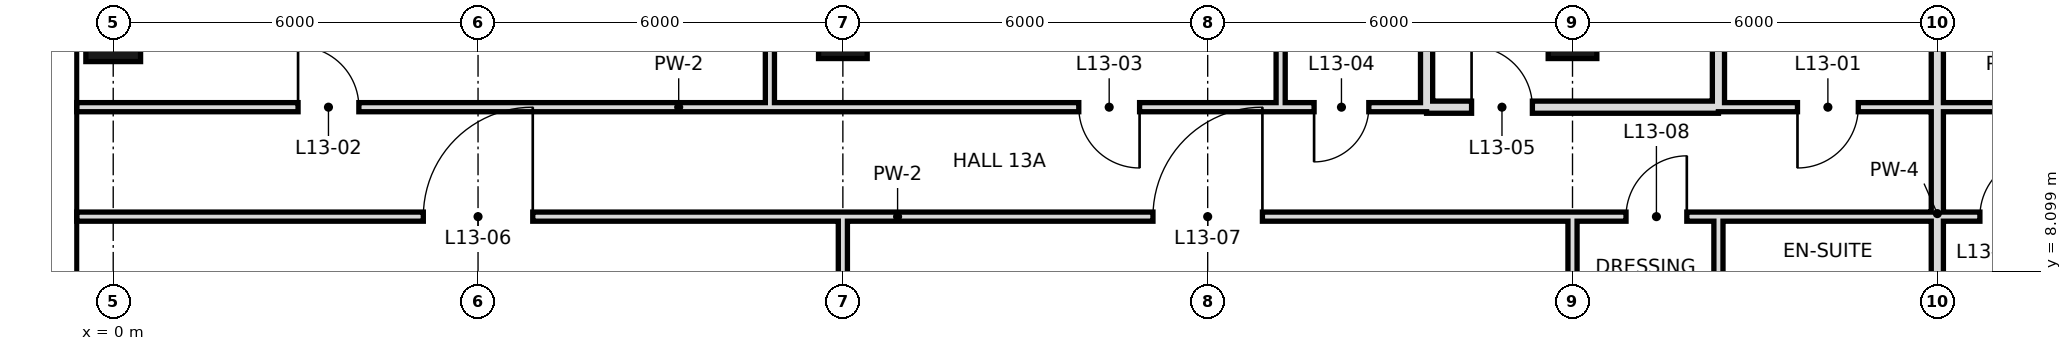
"""IFC4 building model, lengths in metres.
Left out: names, types, materials, properties, quantities, classifications, styles, units other than length and angle.
Written with IfcOpenShell. Run it as: python <this file> out.ifc"""

import sys

from ifc_helpers import new_model, si_unit, direction, frame, frame_2d, origin, origin_2d, place, context, subcontext, project, spatial, rectangle, hollow_rectangle, extrude, element, fill, save


model = new_model("IFC4")
c1 = context("Model", 3, precision=1e-05, world=origin(), true_north=direction((0.0, 1.0)))
c2 = subcontext(c1, "Body", "Model", "MODEL_VIEW")
j1 = project(units=[si_unit("LENGTHUNIT", "METRE"), si_unit("PLANEANGLEUNIT", "RADIAN")], contexts=[c1])
p1 = place(None, origin())
s1 = spatial("IfcSite", under=j1, at=p1, CompositionType="ELEMENT")
p2 = place(p1, origin())
s2 = spatial("IfcBuilding", under=s1, at=p2, CompositionType="ELEMENT")
p3 = place(p2, frame((0.0, 0.0, 67.8)))
s3 = spatial("IfcBuildingStorey", under=s2, at=p3, CompositionType="ELEMENT", Elevation=67.8)
p4 = place(p3, frame((0.0, 12.0, 0.0), z_axis=(0.0, 0.0, 1.0), x_axis=(1.0, 0.0, 0.0)))
e1 = element("IfcColumn", 1, at=p4, inside=s3, PredefinedType="COLUMN", context=c2, shape_type="SweptSolid", body=[
    extrude(hollow_rectangle(XDim=0.9, YDim=0.9, WallThickness=0.045, at=origin_2d()), origin(), (0.0, 0.0, 1.0), 3.6),
])
for number, where, z_axis, x_axis in (
    (2, (12.0, 12.0, 0.0), (0.0, 0.0, 1.0), (1.0, 0.0, 0.0)),
    (3, (24.0, 12.0, 0.0), (0.0, 0.0, 1.0), (1.0, 0.0, 0.0)),
):
    element("IfcColumn", number, at=place(p3, frame(where, z_axis=z_axis, x_axis=x_axis)), inside=s3, PredefinedType="COLUMN", context=c2, shape_type="SweptSolid", body=[
        extrude(hollow_rectangle(XDim=0.8, YDim=0.8, WallThickness=0.04, at=origin_2d()), origin(), (0.0, 0.0, 1.0), 3.6),
    ])
p5 = place(p3, frame((10.8, 10.8, 0.0), z_axis=(0.0, 0.0, 1.0), x_axis=(0.0, 1.0, 0.0)))
e4 = element("IfcWall", 4, at=p5, inside=s3, PredefinedType="PARTITIONING", context=c2, shape_type="SweptSolid", body=[
    extrude(rectangle(XDim=7.9, YDim=0.15, at=frame_2d((3.95, 0.0))), origin(), (0.0, 0.0, 1.0), 3.42),
])
p6 = place(p3, frame((12.0, 0.0, 0.0), z_axis=(0.0, 0.0, 1.0), x_axis=(0.0, 1.0, 0.0)))
e5 = element("IfcWall", 5, at=p6, inside=s3, PredefinedType="PARTITIONING", context=c2, shape_type="SweptSolid", body=[
    extrude(rectangle(XDim=9.0, YDim=0.15, at=frame_2d((4.5, 0.0))), origin(), (0.0, 0.0, 1.0), 2.72),
])
p7 = place(p3, frame((19.2, 10.8, 0.0), z_axis=(0.0, 0.0, 1.0), x_axis=(0.0, 1.0, 0.0)))
e6 = element("IfcWall", 6, at=p7, inside=s3, PredefinedType="PARTITIONING", context=c2, shape_type="SweptSolid", body=[
    extrude(rectangle(XDim=7.9, YDim=0.15, at=frame_2d((3.95, 0.0))), origin(), (0.0, 0.0, 1.0), 3.42),
])
p8 = place(p3, frame((21.6, 10.8, 0.0), z_axis=(0.0, 0.0, 1.0), x_axis=(0.0, 1.0, 0.0)))
e7 = element("IfcWall", 7, at=p8, inside=s3, PredefinedType="SOLIDWALL", context=c2, shape_type="SweptSolid", body=[
    extrude(rectangle(XDim=7.9, YDim=0.2, at=frame_2d((3.95, 0.0))), origin(), (0.0, 0.0, 1.0), 2.72),
])
p9 = place(p3, frame((24.0, 0.0, 0.0), z_axis=(0.0, 0.0, 1.0), x_axis=(0.0, 1.0, 0.0)))
e8 = element("IfcWall", 8, at=p9, inside=s3, PredefinedType="PARTITIONING", context=c2, shape_type="SweptSolid", body=[
    extrude(rectangle(XDim=9.0, YDim=0.15, at=frame_2d((4.5, 0.0))), origin(), (0.0, 0.0, 1.0), 2.72),
])
p10 = place(p3, frame((26.4, 10.8, 0.0), z_axis=(0.0, 0.0, 1.0), x_axis=(0.0, 1.0, 0.0)))
e9 = element("IfcWall", 9, at=p10, inside=s3, PredefinedType="SOLIDWALL", context=c2, shape_type="SweptSolid", body=[
    extrude(rectangle(XDim=7.9, YDim=0.2, at=frame_2d((3.95, 0.0))), origin(), (0.0, 0.0, 1.0), 2.72),
])
p11 = place(p3, frame((26.4, 6.0, 0.0), z_axis=(0.0, 0.0, 1.0), x_axis=(0.0, 1.0, 0.0)))
e10 = element("IfcWall", 10, at=p11, inside=s3, PredefinedType="PARTITIONING", context=c2, shape_type="SweptSolid", body=[
    extrude(rectangle(XDim=3.0, YDim=0.15, at=frame_2d((1.5, 0.0))), origin(), (0.0, 0.0, 1.0), 3.42),
])
p12 = place(p3, frame((30.0, -0.6, 0.0), z_axis=(0.0, 0.0, 1.0), x_axis=(0.0, 1.0, 0.0)))
e11 = element("IfcWall", 11, at=p12, inside=s3, PredefinedType="SOLIDWALL", context=c2, shape_type="SweptSolid", body=[
    extrude(rectangle(XDim=19.3, YDim=0.2, at=frame_2d((9.65, 0.0))), origin(), (0.0, 0.0, 1.0), 2.72),
])
p13 = place(p3, frame((21.6, 10.8, 0.0), z_axis=(0.0, 0.0, 1.0), x_axis=(1.0, 0.0, 0.0)))
e12 = element("IfcWall", 12, at=p13, inside=s3, PredefinedType="SOLIDWALL", context=c2, shape_type="SweptSolid", body=[
    extrude(rectangle(XDim=4.8, YDim=0.2, at=frame_2d((2.4, 0.0))), origin(), (0.0, 0.0, 1.0), 2.72),
])
p14 = place(p13, frame((0.74, 0.0, 0.0)))
e13 = element("IfcOpeningElement", 13, at=p14, cuts=e12, PredefinedType="OPENING", context=c2, shape_type="SweptSolid", body=[
    extrude(rectangle(XDim=1.0, YDim=2.4, at=frame_2d((0.5, 1.2))), frame((0.0, 0.11, 0.0), z_axis=(0.0, -1.0, 0.0), x_axis=(1.0, 0.0, 0.0)), (0.0, 0.0, 1.0), 0.22),
])
p15 = place(p3, frame((-0.6, 10.8, 0.0), z_axis=(0.0, 0.0, 1.0), x_axis=(1.0, 0.0, 0.0)))
e14 = element("IfcWall", 14, at=p15, inside=s3, PredefinedType="PARTITIONING", context=c2, shape_type="SweptSolid", body=[
    extrude(rectangle(XDim=19.8, YDim=0.15, at=frame_2d((9.9, 0.0))), origin(), (0.0, 0.0, 1.0), 3.42),
])
p16 = place(p15, frame((3.64, 0.0, 0.0)))
e15 = element("IfcOpeningElement", 15, at=p16, cuts=e14, PredefinedType="OPENING", context=c2, shape_type="SweptSolid", body=[
    extrude(rectangle(XDim=1.0, YDim=2.4, at=frame_2d((0.5, 1.2))), frame((0.0, 0.085, 0.0), z_axis=(0.0, -1.0, 0.0), x_axis=(1.0, 0.0, 0.0)), (0.0, 0.0, 1.0), 0.17),
])
p17 = place(p15, frame((16.48, 0.0, 0.0)))
e16 = element("IfcOpeningElement", 16, at=p17, cuts=e14, PredefinedType="OPENING", context=c2, shape_type="SweptSolid", body=[
    extrude(rectangle(XDim=1.0, YDim=2.4, at=frame_2d((0.5, 1.2))), frame((0.0, 0.085, 0.0), z_axis=(0.0, -1.0, 0.0), x_axis=(1.0, 0.0, 0.0)), (0.0, 0.0, 1.0), 0.17),
])
p18 = place(p3, frame((26.4, 10.8, 0.0), z_axis=(0.0, 0.0, 1.0), x_axis=(1.0, 0.0, 0.0)))
e17 = element("IfcWall", 17, at=p18, inside=s3, PredefinedType="PARTITIONING", context=c2, shape_type="SweptSolid", body=[
    extrude(rectangle(XDim=9.6, YDim=0.15, at=frame_2d((4.8, 0.0))), origin(), (0.0, 0.0, 1.0), 3.42),
])
p19 = place(p18, frame((1.3, 0.0, 0.0)))
e18 = element("IfcOpeningElement", 18, at=p19, cuts=e17, PredefinedType="OPENING", context=c2, shape_type="SweptSolid", body=[
    extrude(rectangle(XDim=1.0, YDim=2.4, at=frame_2d((0.5, 1.2))), frame((0.0, 0.085, 0.0), z_axis=(0.0, -1.0, 0.0), x_axis=(1.0, 0.0, 0.0)), (0.0, 0.0, 1.0), 0.17),
])
p20 = place(p18, frame((7.0, 0.0, 0.0)))
e19 = element("IfcOpeningElement", 19, at=p20, cuts=e17, PredefinedType="OPENING", context=c2, shape_type="SweptSolid", body=[
    extrude(rectangle(XDim=1.0, YDim=2.4, at=frame_2d((0.5, 1.2))), frame((0.0, 0.085, 0.0), z_axis=(0.0, -1.0, 0.0), x_axis=(1.0, 0.0, 0.0)), (0.0, 0.0, 1.0), 0.17),
])
p21 = place(p3, frame((19.2, 10.8, 0.0), z_axis=(0.0, 0.0, 1.0), x_axis=(1.0, 0.0, 0.0)))
e20 = element("IfcWall", 20, at=p21, inside=s3, PredefinedType="PARTITIONING", context=c2, shape_type="SweptSolid", body=[
    extrude(rectangle(XDim=2.4, YDim=0.15, at=frame_2d((1.2, 0.0))), origin(), (0.0, 0.0, 1.0), 3.42),
])
p22 = place(p21, frame((0.55, 0.0, 0.0)))
e21 = element("IfcOpeningElement", 21, at=p22, cuts=e20, PredefinedType="OPENING", context=c2, shape_type="SweptSolid", body=[
    extrude(rectangle(XDim=0.9, YDim=2.4, at=frame_2d((0.45, 1.2))), frame((0.0, 0.085, 0.0), z_axis=(0.0, -1.0, 0.0), x_axis=(1.0, 0.0, 0.0)), (0.0, 0.0, 1.0), 0.17),
])
p23 = place(p3, frame((-0.6, 9.0, 0.0), z_axis=(0.0, 0.0, 1.0), x_axis=(1.0, 0.0, 0.0)))
e22 = element("IfcWall", 22, at=p23, inside=s3, PredefinedType="PARTITIONING", context=c2, shape_type="SweptSolid", body=[
    extrude(rectangle(XDim=27.0, YDim=0.15, at=frame_2d((13.5, 0.0))), origin(), (0.0, 0.0, 1.0), 3.42),
])
p24 = place(p23, frame((5.7, 0.0, 0.0)))
e23 = element("IfcOpeningElement", 23, at=p24, cuts=e22, PredefinedType="OPENING", context=c2, shape_type="SweptSolid", body=[
    extrude(rectangle(XDim=1.8, YDim=2.4, at=frame_2d((0.9, 1.2))), frame((0.0, 0.085, 0.0), z_axis=(0.0, -1.0, 0.0), x_axis=(1.0, 0.0, 0.0)), (0.0, 0.0, 1.0), 0.17),
])
p25 = place(p23, frame((17.7, 0.0, 0.0)))
e24 = element("IfcOpeningElement", 24, at=p25, cuts=e22, PredefinedType="OPENING", context=c2, shape_type="SweptSolid", body=[
    extrude(rectangle(XDim=1.8, YDim=2.4, at=frame_2d((0.9, 1.2))), frame((0.0, 0.085, 0.0), z_axis=(0.0, -1.0, 0.0), x_axis=(1.0, 0.0, 0.0)), (0.0, 0.0, 1.0), 0.17),
])
p26 = place(p23, frame((25.48, 0.0, 0.0)))
e25 = element("IfcOpeningElement", 25, at=p26, cuts=e22, PredefinedType="OPENING", context=c2, shape_type="SweptSolid", body=[
    extrude(rectangle(XDim=1.0, YDim=2.4, at=frame_2d((0.5, 1.2))), frame((0.0, 0.085, 0.0), z_axis=(0.0, -1.0, 0.0), x_axis=(1.0, 0.0, 0.0)), (0.0, 0.0, 1.0), 0.17),
])
p27 = place(p3, frame((30.0, 9.0, 0.0), z_axis=(0.0, 0.0, 1.0), x_axis=(1.0, 0.0, 0.0)))
e26 = element("IfcWall", 26, at=p27, inside=s3, PredefinedType="PARTITIONING", context=c2, shape_type="SweptSolid", body=[
    extrude(rectangle(XDim=2.4, YDim=0.15, at=frame_2d((1.2, 0.0))), origin(), (0.0, 0.0, 1.0), 3.42),
])
p28 = place(p27, frame((0.7, 0.0, 0.0)))
e27 = element("IfcOpeningElement", 27, at=p28, cuts=e26, PredefinedType="OPENING", context=c2, shape_type="SweptSolid", body=[
    extrude(rectangle(XDim=1.0, YDim=2.4, at=frame_2d((0.5, 1.2))), frame((0.0, 0.085, 0.0), z_axis=(0.0, -1.0, 0.0), x_axis=(1.0, 0.0, 0.0)), (0.0, 0.0, 1.0), 0.17),
])
p29 = place(p3, frame((26.4, 9.0, 0.0), z_axis=(0.0, 0.0, 1.0), x_axis=(1.0, 0.0, 0.0)))
e28 = element("IfcWall", 28, at=p29, inside=s3, PredefinedType="PARTITIONING", context=c2, shape_type="SweptSolid", body=[
    extrude(rectangle(XDim=3.6, YDim=0.15, at=frame_2d((1.8, 0.0))), origin(), (0.0, 0.0, 1.0), 3.42),
])
p30 = place(p19, frame((1.0, 0.0, 0.0), z_axis=(0.0, 0.0, 1.0), x_axis=(-1.0, 0.0, 0.0)))
e29 = element("IfcDoor", 29, at=p30, inside=s3, OperationType="SINGLE_SWING_RIGHT", PredefinedType="DOOR", context=c2, shape_type="SweptSolid", body=[
    extrude(rectangle(XDim=1.0, YDim=2.4, at=frame_2d((0.5, 1.2))), frame((0.0, 0.025, 0.0), z_axis=(0.0, -1.0, 0.0), x_axis=(1.0, 0.0, 0.0)), (0.0, 0.0, 1.0), 0.05),
])
fill(e18, e29)
p31 = place(p16, origin())
e30 = element("IfcDoor", 30, at=p31, inside=s3, OperationType="SINGLE_SWING_LEFT", PredefinedType="DOOR", context=c2, shape_type="SweptSolid", body=[
    extrude(rectangle(XDim=1.0, YDim=2.4, at=frame_2d((0.5, 1.2))), frame((0.0, 0.025, 0.0), z_axis=(0.0, -1.0, 0.0), x_axis=(1.0, 0.0, 0.0)), (0.0, 0.0, 1.0), 0.05),
])
fill(e15, e30)
p32 = place(p17, origin())
e31 = element("IfcDoor", 31, at=p32, inside=s3, OperationType="SINGLE_SWING_RIGHT", PredefinedType="DOOR", context=c2, shape_type="SweptSolid", body=[
    extrude(rectangle(XDim=1.0, YDim=2.4, at=frame_2d((0.5, 1.2))), frame((0.0, 0.025, 0.0), z_axis=(0.0, -1.0, 0.0), x_axis=(1.0, 0.0, 0.0)), (0.0, 0.0, 1.0), 0.05),
])
fill(e16, e31)
p33 = place(p22, frame((0.9, 0.0, 0.0), z_axis=(0.0, 0.0, 1.0), x_axis=(-1.0, 0.0, 0.0)))
e32 = element("IfcDoor", 32, at=p33, inside=s3, OperationType="SINGLE_SWING_RIGHT", PredefinedType="DOOR", context=c2, shape_type="SweptSolid", body=[
    extrude(rectangle(XDim=0.9, YDim=2.4, at=frame_2d((0.45, 1.2))), frame((0.0, 0.025, 0.0), z_axis=(0.0, -1.0, 0.0), x_axis=(1.0, 0.0, 0.0)), (0.0, 0.0, 1.0), 0.05),
])
fill(e21, e32)
p34 = place(p14, origin())
e33 = element("IfcDoor", 33, at=p34, inside=s3, OperationType="SINGLE_SWING_LEFT", PredefinedType="DOOR", context=c2, shape_type="SweptSolid", body=[
    extrude(rectangle(XDim=1.0, YDim=2.4, at=frame_2d((0.5, 1.2))), frame((0.0, 0.025, 0.0), z_axis=(0.0, -1.0, 0.0), x_axis=(1.0, 0.0, 0.0)), (0.0, 0.0, 1.0), 0.05),
])
fill(e13, e33)
p35 = place(p24, frame((1.8, 0.0, 0.0), z_axis=(0.0, 0.0, 1.0), x_axis=(-1.0, 0.0, 0.0)))
e34 = element("IfcDoor", 34, at=p35, inside=s3, OperationType="SINGLE_SWING_LEFT", PredefinedType="DOOR", context=c2, shape_type="SweptSolid", body=[
    extrude(rectangle(XDim=1.8, YDim=2.4, at=frame_2d((0.9, 1.2))), frame((0.0, 0.025, 0.0), z_axis=(0.0, -1.0, 0.0), x_axis=(1.0, 0.0, 0.0)), (0.0, 0.0, 1.0), 0.05),
])
fill(e23, e34)
p36 = place(p25, frame((1.8, 0.0, 0.0), z_axis=(0.0, 0.0, 1.0), x_axis=(-1.0, 0.0, 0.0)))
e35 = element("IfcDoor", 35, at=p36, inside=s3, OperationType="SINGLE_SWING_LEFT", PredefinedType="DOOR", context=c2, shape_type="SweptSolid", body=[
    extrude(rectangle(XDim=1.8, YDim=2.4, at=frame_2d((0.9, 1.2))), frame((0.0, 0.025, 0.0), z_axis=(0.0, -1.0, 0.0), x_axis=(1.0, 0.0, 0.0)), (0.0, 0.0, 1.0), 0.05),
])
fill(e24, e35)
p37 = place(p26, frame((1.0, 0.0, 0.0), z_axis=(0.0, 0.0, 1.0), x_axis=(-1.0, 0.0, 0.0)))
e36 = element("IfcDoor", 36, at=p37, inside=s3, OperationType="SINGLE_SWING_LEFT", PredefinedType="DOOR", context=c2, shape_type="SweptSolid", body=[
    extrude(rectangle(XDim=1.0, YDim=2.4, at=frame_2d((0.5, 1.2))), frame((0.0, 0.025, 0.0), z_axis=(0.0, -1.0, 0.0), x_axis=(1.0, 0.0, 0.0)), (0.0, 0.0, 1.0), 0.05),
])
fill(e25, e36)
p38 = place(p28, frame((1.0, 0.0, 0.0), z_axis=(0.0, 0.0, 1.0), x_axis=(-1.0, 0.0, 0.0)))
e37 = element("IfcDoor", 37, at=p38, inside=s3, OperationType="SINGLE_SWING_LEFT", PredefinedType="DOOR", context=c2, shape_type="SweptSolid", body=[
    extrude(rectangle(XDim=1.0, YDim=2.4, at=frame_2d((0.5, 1.2))), frame((0.0, 0.025, 0.0), z_axis=(0.0, -1.0, 0.0), x_axis=(1.0, 0.0, 0.0)), (0.0, 0.0, 1.0), 0.05),
])
fill(e27, e37)
save(model, sys.argv[1])
